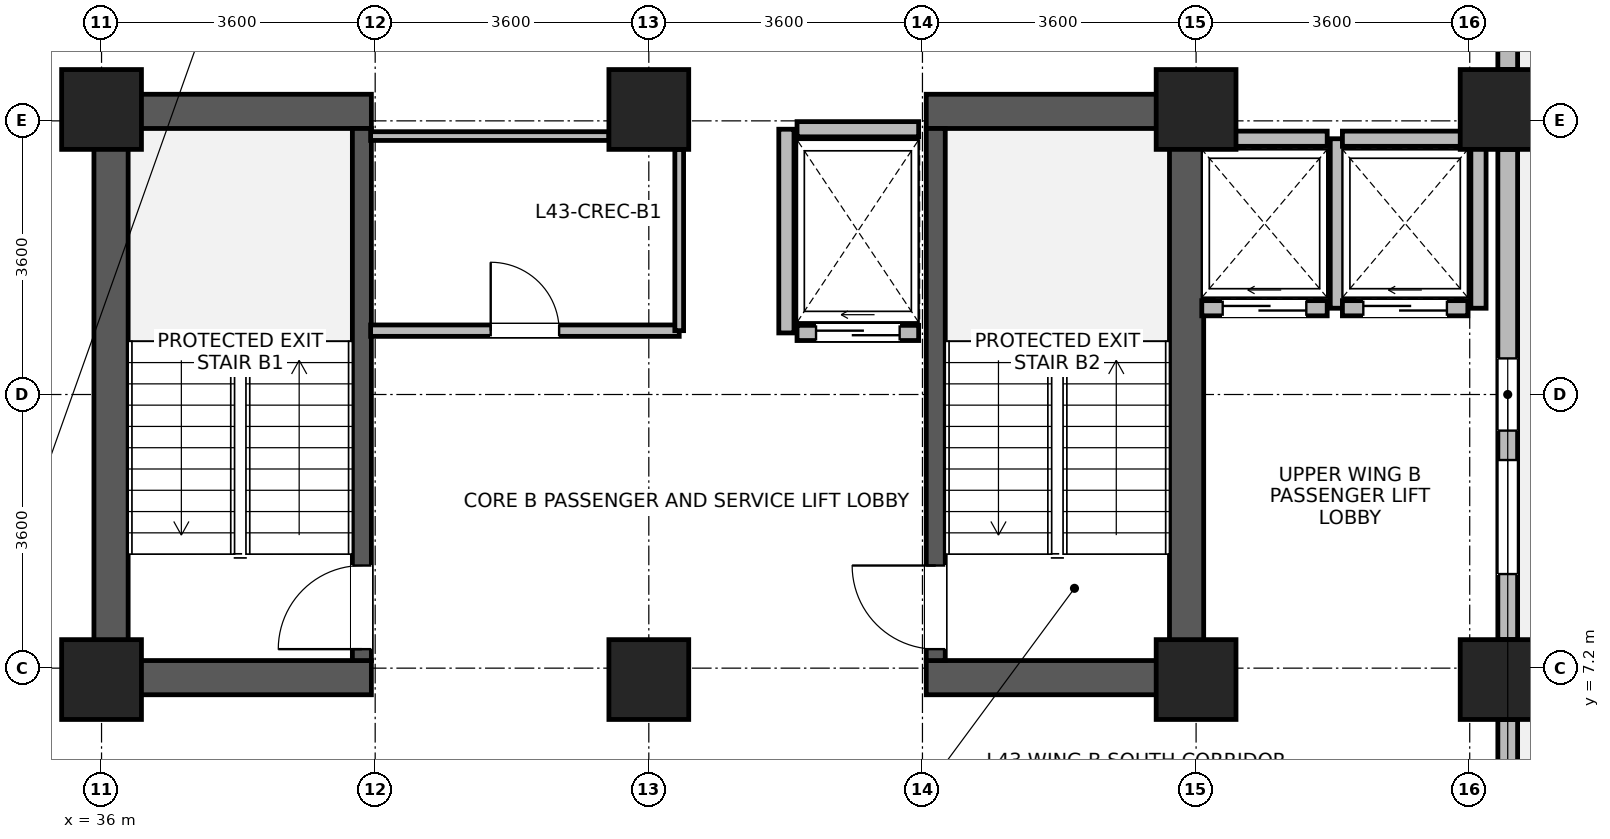
"""IFC4 building model, lengths in metres.
Left out: names, types, materials, properties, quantities, classifications, styles, units other than length and angle.
Written with IfcOpenShell. Run it as: python <this file> out.ifc"""

import sys

from ifc_helpers import new_model, si_unit, direction, frame, frame_2d, origin, origin_2d, place, context, subcontext, project, spatial, rectangle, extrude, source, transform, mapped, element, fill, save


model = new_model("IFC4")
c1 = context("Model", 3, precision=1e-05, world=origin(), true_north=direction((0.0, 1.0)))
c2 = subcontext(c1, "Body", "Model", "MODEL_VIEW")
j1 = project(units=[si_unit("LENGTHUNIT", "METRE"), si_unit("PLANEANGLEUNIT", "RADIAN")], contexts=[c1])
p1 = place(None, origin())
s1 = spatial("IfcSite", under=j1, at=p1, CompositionType="ELEMENT")
p2 = place(p1, origin())
s2 = spatial("IfcBuilding", under=s1, at=p2, CompositionType="ELEMENT")
p3 = place(p2, frame((0.0, 0.0, 169.8)))
s3 = spatial("IfcBuildingStorey", under=s2, at=p3, CompositionType="ELEMENT", Elevation=169.8)
for number, where, z_axis, x_axis in (
    (1, (36.125, 6.85, 0.0), (0.0, 0.0, 1.0), (0.0, 1.0, 0.0)),
    (2, (50.275, 6.85, 0.0), (0.0, 0.0, 1.0), (0.0, 1.0, 0.0)),
):
    element("IfcWall", number, at=place(p3, frame(where, z_axis=z_axis, x_axis=x_axis)), inside=s3, PredefinedType="SHEAR", context=c2, shape_type="SweptSolid", body=[
        extrude(rectangle(XDim=7.9, YDim=0.45, at=frame_2d((3.95, 0.0))), origin(), (0.0, 0.0, 1.0), 3.46),
    ])
for number, where, z_axis, x_axis in (
    (3, (36.35, 7.075, 0.0), (0.0, 0.0, 1.0), (1.0, 0.0, 0.0)),
    (4, (46.85, 7.075, 0.0), (0.0, 0.0, 1.0), (1.0, 0.0, 0.0)),
    (5, (36.35, 14.525, 0.0), (0.0, 0.0, 1.0), (1.0, 0.0, 0.0)),
    (6, (46.85, 14.525, 0.0), (0.0, 0.0, 1.0), (1.0, 0.0, 0.0)),
):
    element("IfcWall", number, at=place(p3, frame(where, z_axis=z_axis, x_axis=x_axis)), inside=s3, PredefinedType="SHEAR", context=c2, shape_type="SweptSolid", body=[
        extrude(rectangle(XDim=3.2, YDim=0.45, at=frame_2d((1.6, 0.0))), origin(), (0.0, 0.0, 1.0), 3.46),
    ])
p4 = place(p3, frame((39.425, 7.3, 0.0), z_axis=(0.0, 0.0, 1.0), x_axis=(0.0, 1.0, 0.0)))
e7 = element("IfcWall", 7, at=p4, inside=s3, PredefinedType="SHEAR", context=c2, shape_type="SweptSolid", body=[
    extrude(rectangle(XDim=7.0, YDim=0.25, at=frame_2d((3.5, 0.0))), origin(), (0.0, 0.0, 1.0), 3.46),
])
p5 = place(p4, frame((0.15, 0.0, 0.0)))
e8 = element("IfcOpeningElement", 8, at=p5, cuts=e7, PredefinedType="OPENING", context=c2, shape_type="SweptSolid", body=[
    extrude(rectangle(XDim=1.1, YDim=2.08, at=frame_2d((0.55, 1.04))), frame((0.0, 0.135, 0.0), z_axis=(0.0, -1.0, 0.0), x_axis=(1.0, 0.0, 0.0)), (0.0, 0.0, 1.0), 0.27),
])
p6 = place(p3, frame((46.975, 7.3, 0.0), z_axis=(0.0, 0.0, 1.0), x_axis=(0.0, 1.0, 0.0)))
e9 = element("IfcWall", 9, at=p6, inside=s3, PredefinedType="SHEAR", context=c2, shape_type="SweptSolid", body=[
    extrude(rectangle(XDim=7.0, YDim=0.25, at=frame_2d((3.5, 0.0))), origin(), (0.0, 0.0, 1.0), 3.46),
])
p7 = place(p6, frame((0.15, 0.0, 0.0)))
e10 = element("IfcOpeningElement", 10, at=p7, cuts=e9, PredefinedType="OPENING", context=c2, shape_type="SweptSolid", body=[
    extrude(rectangle(XDim=1.1, YDim=2.08, at=frame_2d((0.55, 1.04))), frame((0.0, 0.135, 0.0), z_axis=(0.0, -1.0, 0.0), x_axis=(1.0, 0.0, 0.0)), (0.0, 0.0, 1.0), 0.27),
])
m1 = source(origin(), c2, "Body", "SweptSolid", [
    extrude(rectangle(XDim=1.05, YDim=1.05, at=origin_2d()), origin(), (0.0, 0.0, 1.0), 3.7),
])
for number, where, z_axis, x_axis in (
    (11, (36.0, 7.05, 0.0), (0.0, 0.0, 1.0), (1.0, 0.0, 0.0)),
    (12, (36.0, 14.55, 0.0), (0.0, 0.0, 1.0), (1.0, 0.0, 0.0)),
    (13, (43.2, 7.05, 0.0), (0.0, 0.0, 1.0), (1.0, 0.0, 0.0)),
    (14, (43.2, 14.55, 0.0), (0.0, 0.0, 1.0), (1.0, 0.0, 0.0)),
    (15, (50.4, 7.05, 0.0), (0.0, 0.0, 1.0), (1.0, 0.0, 0.0)),
    (16, (50.4, 14.55, 0.0), (0.0, 0.0, 1.0), (1.0, 0.0, 0.0)),
    (17, (54.4, 7.05, 0.0), (0.0, 0.0, 1.0), (1.0, 0.0, 0.0)),
    (18, (54.4, 14.55, 0.0), (0.0, 0.0, 1.0), (1.0, 0.0, 0.0)),
):
    element("IfcColumn", number, at=place(p3, frame(where, z_axis=z_axis, x_axis=x_axis)), inside=s3, PredefinedType="COLUMN", context=c2, shape_type="MappedRepresentation", body=[
        mapped(m1, transform((0.0, 0.0, 0.0), x_axis=(1.0, 0.0, 0.0), y_axis=(0.0, 1.0, 0.0), z_axis=(0.0, 0.0, 1.0), scale=1.0)),
    ])
p8 = place(p3, frame((54.5, 6.524, 0.0), z_axis=(0.0, 0.0, 1.0), x_axis=(0.0, -1.0, 0.0)))
e19 = element("IfcWall", 19, at=p8, inside=s3, PredefinedType="STANDARD", context=c2, shape_type="SweptSolid", body=[
    extrude(rectangle(XDim=1.854, YDim=0.26, at=frame_2d((0.927, 0.0))), origin(), (0.0, 0.0, 1.0), 3.44),
])
p9 = place(p3, frame((54.5, 14.024, 0.0), z_axis=(0.0, 0.0, 1.0), x_axis=(0.0, -1.0, 0.0)))
e20 = element("IfcWall", 20, at=p9, inside=s3, PredefinedType="STANDARD", context=c2, shape_type="SweptSolid", body=[
    extrude(rectangle(XDim=6.448, YDim=0.26, at=frame_2d((3.224, 0.0))), origin(), (0.0, 0.0, 1.0), 2.99),
])
p10 = place(p9, frame((4.086, 0.0, 0.85)))
e21 = element("IfcOpeningElement", 21, at=p10, cuts=e20, PredefinedType="OPENING", context=c2, shape_type="SweptSolid", body=[
    extrude(rectangle(XDim=1.5, YDim=1.85, at=frame_2d((0.75, 0.925))), frame((0.0, 0.14, 0.0), z_axis=(0.0, -1.0, 0.0), x_axis=(1.0, 0.0, 0.0)), (0.0, 0.0, 1.0), 0.28),
])
p11 = place(p9, frame((2.749, 0.0, 0.85)))
e22 = element("IfcOpeningElement", 22, at=p11, cuts=e20, PredefinedType="OPENING", context=c2, shape_type="SweptSolid", body=[
    extrude(rectangle(XDim=0.95, YDim=1.75, at=frame_2d((0.475, 0.875))), frame((0.0, 0.14, 0.0), z_axis=(0.0, -1.0, 0.0), x_axis=(1.0, 0.0, 0.0)), (0.0, 0.0, 1.0), 0.28),
])
p12 = place(p3, frame((54.5, 21.074, 0.0), z_axis=(0.0, 0.0, 1.0), x_axis=(0.0, -1.0, 0.0)))
e23 = element("IfcWall", 23, at=p12, inside=s3, PredefinedType="STANDARD", context=c2, shape_type="SweptSolid", body=[
    extrude(rectangle(XDim=5.998, YDim=0.26, at=frame_2d((2.999, 0.0))), origin(), (0.0, 0.0, 1.0), 2.99),
])
p13 = place(p12, frame((2.249, 0.0, 0.0)))
e24 = element("IfcOpeningElement", 24, at=p13, cuts=e23, PredefinedType="OPENING", context=c2, shape_type="SweptSolid", body=[
    extrude(rectangle(XDim=1.5, YDim=2.15, at=frame_2d((0.75, 1.075))), frame((0.0, 0.14, 0.0), z_axis=(0.0, -1.0, 0.0), x_axis=(1.0, 0.0, 0.0)), (0.0, 0.0, 1.0), 0.28),
])
p14 = place(p3, frame((50.475, 11.935, 0.0), z_axis=(0.0, 0.0, 1.0), x_axis=(1.0, 0.0, 0.0)))
e25 = element("IfcWall", 25, at=p14, inside=s3, PredefinedType="PARTITIONING", context=c2, shape_type="SweptSolid", body=[
    extrude(rectangle(XDim=1.65, YDim=0.2, at=frame_2d((0.825, 0.0))), origin(), (0.0, 0.0, 1.0), 3.44),
])
p15 = place(p14, frame((0.275, 0.0, 0.0)))
e26 = element("IfcOpeningElement", 26, at=p15, cuts=e25, PredefinedType="OPENING", context=c2, shape_type="SweptSolid", body=[
    extrude(rectangle(XDim=1.1, YDim=2.12, at=frame_2d((0.55, 1.06))), frame((0.0, 0.11, 0.0), z_axis=(0.0, -1.0, 0.0), x_axis=(1.0, 0.0, 0.0)), (0.0, 0.0, 1.0), 0.22),
])
p16 = place(p3, frame((50.475, 14.165, 0.0), z_axis=(0.0, 0.0, 1.0), x_axis=(1.0, 0.0, 0.0)))
e27 = element("IfcWall", 27, at=p16, inside=s3, PredefinedType="PARTITIONING", context=c2, shape_type="SweptSolid", body=[
    extrude(rectangle(XDim=1.65, YDim=0.2, at=frame_2d((0.825, 0.0))), origin(), (0.0, 0.0, 1.0), 3.44),
])
p17 = place(p3, frame((52.265, 11.935, 0.0), z_axis=(0.0, 0.0, 1.0), x_axis=(0.0, 1.0, 0.0)))
e28 = element("IfcWall", 28, at=p17, inside=s3, PredefinedType="PARTITIONING", context=c2, shape_type="SweptSolid", body=[
    extrude(rectangle(XDim=2.23, YDim=0.2, at=frame_2d((1.115, 0.0))), origin(), (0.0, 0.0, 1.0), 3.44),
])
p18 = place(p3, frame((52.325, 11.935, 0.0), z_axis=(0.0, 0.0, 1.0), x_axis=(1.0, 0.0, 0.0)))
e29 = element("IfcWall", 29, at=p18, inside=s3, PredefinedType="PARTITIONING", context=c2, shape_type="SweptSolid", body=[
    extrude(rectangle(XDim=1.65, YDim=0.2, at=frame_2d((0.825, 0.0))), origin(), (0.0, 0.0, 1.0), 3.44),
])
p19 = place(p18, frame((0.275, 0.0, 0.0)))
e30 = element("IfcOpeningElement", 30, at=p19, cuts=e29, PredefinedType="OPENING", context=c2, shape_type="SweptSolid", body=[
    extrude(rectangle(XDim=1.1, YDim=2.12, at=frame_2d((0.55, 1.06))), frame((0.0, 0.11, 0.0), z_axis=(0.0, -1.0, 0.0), x_axis=(1.0, 0.0, 0.0)), (0.0, 0.0, 1.0), 0.22),
])
p20 = place(p3, frame((52.325, 14.165, 0.0), z_axis=(0.0, 0.0, 1.0), x_axis=(1.0, 0.0, 0.0)))
e31 = element("IfcWall", 31, at=p20, inside=s3, PredefinedType="PARTITIONING", context=c2, shape_type="SweptSolid", body=[
    extrude(rectangle(XDim=1.65, YDim=0.2, at=frame_2d((0.825, 0.0))), origin(), (0.0, 0.0, 1.0), 3.44),
])
p21 = place(p3, frame((54.115, 11.935, 0.0), z_axis=(0.0, 0.0, 1.0), x_axis=(0.0, 1.0, 0.0)))
e32 = element("IfcWall", 32, at=p21, inside=s3, PredefinedType="PARTITIONING", context=c2, shape_type="SweptSolid", body=[
    extrude(rectangle(XDim=2.23, YDim=0.2, at=frame_2d((1.115, 0.0))), origin(), (0.0, 0.0, 1.0), 2.99),
])
p22 = place(p3, frame((45.15, 11.61, 0.0), z_axis=(0.0, 0.0, 1.0), x_axis=(1.0, 0.0, 0.0)))
e33 = element("IfcWall", 33, at=p22, inside=s3, PredefinedType="PARTITIONING", context=c2, shape_type="SweptSolid", body=[
    extrude(rectangle(XDim=1.6, YDim=0.2, at=frame_2d((0.8, 0.0))), origin(), (0.0, 0.0, 1.0), 3.44),
])
p23 = place(p22, frame((0.25, 0.0, 0.0)))
e34 = element("IfcOpeningElement", 34, at=p23, cuts=e33, PredefinedType="OPENING", context=c2, shape_type="SweptSolid", body=[
    extrude(rectangle(XDim=1.1, YDim=2.12, at=frame_2d((0.55, 1.06))), frame((0.0, 0.11, 0.0), z_axis=(0.0, -1.0, 0.0), x_axis=(1.0, 0.0, 0.0)), (0.0, 0.0, 1.0), 0.22),
])
p24 = place(p3, frame((45.15, 14.29, 0.0), z_axis=(0.0, 0.0, 1.0), x_axis=(1.0, 0.0, 0.0)))
e35 = element("IfcWall", 35, at=p24, inside=s3, PredefinedType="PARTITIONING", context=c2, shape_type="SweptSolid", body=[
    extrude(rectangle(XDim=1.6, YDim=0.2, at=frame_2d((0.8, 0.0))), origin(), (0.0, 0.0, 1.0), 2.44),
])
p25 = place(p3, frame((45.01, 11.61, 0.0), z_axis=(0.0, 0.0, 1.0), x_axis=(0.0, 1.0, 0.0)))
e36 = element("IfcWall", 36, at=p25, inside=s3, PredefinedType="PARTITIONING", context=c2, shape_type="SweptSolid", body=[
    extrude(rectangle(XDim=2.68, YDim=0.2, at=frame_2d((1.34, 0.0))), origin(), (0.0, 0.0, 1.0), 3.44),
])
p26 = place(p3, frame((39.54, 11.64, 0.0), z_axis=(0.0, 0.0, 1.0), x_axis=(1.0, 0.0, 0.0)))
e37 = element("IfcWall", 37, at=p26, inside=s3, PredefinedType="PARTITIONING", context=c2, shape_type="SweptSolid", body=[
    extrude(rectangle(XDim=4.06, YDim=0.15, at=frame_2d((2.03, 0.0))), origin(), (0.0, 0.0, 1.0), 3.44),
])
p27 = place(p26, frame((1.58, 0.0, 0.0)))
e38 = element("IfcOpeningElement", 38, at=p27, cuts=e37, PredefinedType="OPENING", context=c2, shape_type="SweptSolid", body=[
    extrude(rectangle(XDim=0.9, YDim=2.08, at=frame_2d((0.45, 1.04))), frame((0.0, 0.085, 0.0), z_axis=(0.0, -1.0, 0.0), x_axis=(1.0, 0.0, 0.0)), (0.0, 0.0, 1.0), 0.17),
])
p28 = place(p3, frame((39.54, 14.2, 0.0), z_axis=(0.0, 0.0, 1.0), x_axis=(1.0, 0.0, 0.0)))
e39 = element("IfcWall", 39, at=p28, inside=s3, PredefinedType="PARTITIONING", context=c2, shape_type="SweptSolid", body=[
    extrude(rectangle(XDim=3.135, YDim=0.115, at=frame_2d((1.567, 0.0))), origin(), (0.0, 0.0, 1.0), 2.44),
])
p29 = place(p3, frame((43.6, 11.64, 0.0), z_axis=(0.0, 0.0, 1.0), x_axis=(0.0, 1.0, 0.0)))
e40 = element("IfcWall", 40, at=p29, inside=s3, PredefinedType="PARTITIONING", context=c2, shape_type="SweptSolid", body=[
    extrude(rectangle(XDim=2.385, YDim=0.115, at=frame_2d((1.192, 0.0))), origin(), (0.0, 0.0, 1.0), 3.44),
])
p30 = place(p10, origin())
e41 = element("IfcWindow", 41, at=p30, inside=s3, PartitioningType="SINGLE_PANEL", PredefinedType="WINDOW", context=c2, shape_type="SweptSolid", body=[
    extrude(rectangle(XDim=1.5, YDim=1.85, at=frame_2d((0.75, 0.925))), frame((0.0, 0.03, 0.0), z_axis=(0.0, -1.0, 0.0), x_axis=(1.0, 0.0, 0.0)), (0.0, 0.0, 1.0), 0.06),
])
fill(e21, e41)
p31 = place(p11, origin())
e42 = element("IfcWindow", 42, at=p31, inside=s3, PartitioningType="SINGLE_PANEL", PredefinedType="WINDOW", context=c2, shape_type="SweptSolid", body=[
    extrude(rectangle(XDim=0.95, YDim=1.75, at=frame_2d((0.475, 0.875))), frame((0.0, 0.03, 0.0), z_axis=(0.0, -1.0, 0.0), x_axis=(1.0, 0.0, 0.0)), (0.0, 0.0, 1.0), 0.06),
])
fill(e22, e42)
p32 = place(p5, origin())
e43 = element("IfcDoor", 43, at=p32, inside=s3, OperationType="SINGLE_SWING_LEFT", PredefinedType="DOOR", context=c2, shape_type="SweptSolid", body=[
    extrude(rectangle(XDim=1.1, YDim=2.08, at=frame_2d((0.55, 1.04))), frame((0.0, 0.025, 0.0), z_axis=(0.0, -1.0, 0.0), x_axis=(1.0, 0.0, 0.0)), (0.0, 0.0, 1.0), 0.05),
])
fill(e8, e43)
p33 = place(p7, origin())
e44 = element("IfcDoor", 44, at=p33, inside=s3, OperationType="SINGLE_SWING_RIGHT", PredefinedType="DOOR", context=c2, shape_type="SweptSolid", body=[
    extrude(rectangle(XDim=1.1, YDim=2.08, at=frame_2d((0.55, 1.04))), frame((0.0, 0.025, 0.0), z_axis=(0.0, -1.0, 0.0), x_axis=(1.0, 0.0, 0.0)), (0.0, 0.0, 1.0), 0.05),
])
fill(e10, e44)
p34 = place(p15, origin())
e45 = element("IfcDoor", 45, at=p34, inside=s3, OperationType="SLIDING_TO_LEFT", PredefinedType="DOOR", context=c2, shape_type="SweptSolid", body=[
    extrude(rectangle(XDim=1.1, YDim=2.12, at=frame_2d((0.55, 1.06))), frame((0.0, 0.025, 0.0), z_axis=(0.0, -1.0, 0.0), x_axis=(1.0, 0.0, 0.0)), (0.0, 0.0, 1.0), 0.05),
])
fill(e26, e45)
p35 = place(p19, origin())
e46 = element("IfcDoor", 46, at=p35, inside=s3, OperationType="SLIDING_TO_LEFT", PredefinedType="DOOR", context=c2, shape_type="SweptSolid", body=[
    extrude(rectangle(XDim=1.1, YDim=2.12, at=frame_2d((0.55, 1.06))), frame((0.0, 0.025, 0.0), z_axis=(0.0, -1.0, 0.0), x_axis=(1.0, 0.0, 0.0)), (0.0, 0.0, 1.0), 0.05),
])
fill(e30, e46)
p36 = place(p23, origin())
e47 = element("IfcDoor", 47, at=p36, inside=s3, OperationType="SLIDING_TO_LEFT", PredefinedType="DOOR", context=c2, shape_type="SweptSolid", body=[
    extrude(rectangle(XDim=1.1, YDim=2.12, at=frame_2d((0.55, 1.06))), frame((0.0, 0.025, 0.0), z_axis=(0.0, -1.0, 0.0), x_axis=(1.0, 0.0, 0.0)), (0.0, 0.0, 1.0), 0.05),
])
fill(e34, e47)
p37 = place(p27, origin())
e48 = element("IfcDoor", 48, at=p37, inside=s3, OperationType="SINGLE_SWING_LEFT", PredefinedType="DOOR", context=c2, shape_type="SweptSolid", body=[
    extrude(rectangle(XDim=0.9, YDim=2.08, at=frame_2d((0.45, 1.04))), frame((0.0, 0.025, 0.0), z_axis=(0.0, -1.0, 0.0), x_axis=(1.0, 0.0, 0.0)), (0.0, 0.0, 1.0), 0.05),
])
fill(e38, e48)
save(model, sys.argv[1])
